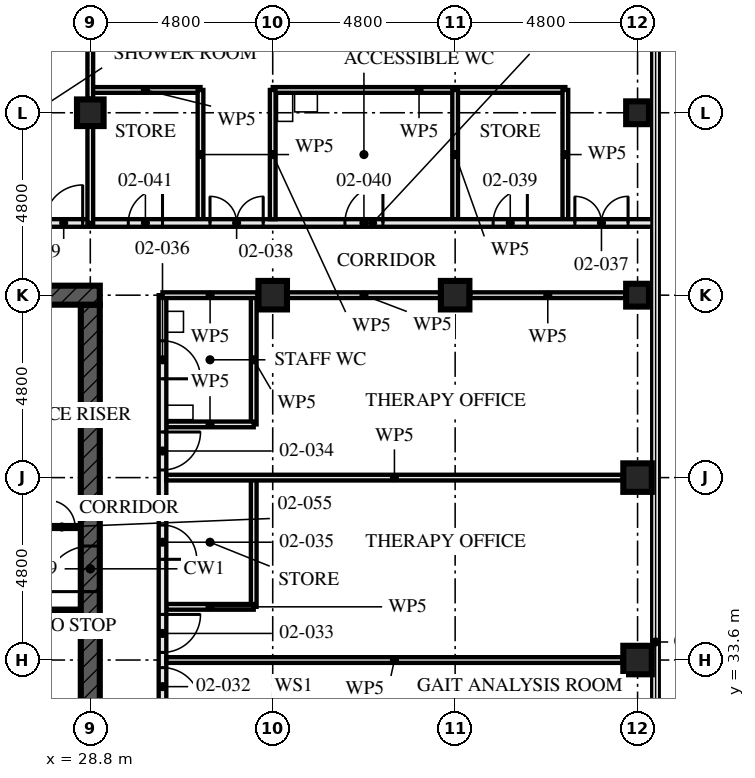
"""IFC4 building model, lengths in metres.
Left out: names, types, materials, properties, quantities, classifications, styles, units other than length and angle.
Written with IfcOpenShell. Run it as: python <this file> out.ifc"""

import sys

from ifc_helpers import new_model, si_unit, direction, frame, frame_2d, origin, origin_2d, place, context, subcontext, project, spatial, rectangle, hollow_rectangle, extrude, element, fill, save


model = new_model("IFC4")
c1 = context("Model", 3, precision=1e-05, world=origin(), true_north=direction((0.0, 1.0)))
c2 = subcontext(c1, "Body", "Model", "MODEL_VIEW")
j1 = project(units=[si_unit("LENGTHUNIT", "METRE"), si_unit("PLANEANGLEUNIT", "RADIAN")], contexts=[c1])
p1 = place(None, origin())
s1 = spatial("IfcSite", under=j1, at=p1, CompositionType="ELEMENT")
p2 = place(p1, origin())
s2 = spatial("IfcBuilding", under=s1, at=p2, CompositionType="ELEMENT")
p3 = place(p2, frame((0.0, 0.0, 9.0)))
s3 = spatial("IfcBuildingStorey", under=s2, at=p3, CompositionType="ELEMENT", Elevation=9.0)
p4 = place(p3, frame((28.8, 48.0, 0.0), z_axis=(0.0, 0.0, 1.0), x_axis=(1.0, 0.0, 0.0)))
e1 = element("IfcColumn", 1, at=p4, inside=s3, PredefinedType="COLUMN", context=c2, shape_type="SweptSolid", body=[
    extrude(hollow_rectangle(XDim=0.7, YDim=0.7, WallThickness=0.06, at=origin_2d()), origin(), (0.0, 0.0, 1.0), 4.5),
])
for number, where, z_axis, x_axis in (
    (2, (33.6, 43.2, 0.0), (0.0, 0.0, 1.0), (0.0, 1.0, 0.0)),
    (3, (38.4, 43.2, 0.0), (0.0, 0.0, 1.0), (0.0, 1.0, 0.0)),
    (4, (43.2, 33.6, 0.0), (0.0, 0.0, 1.0), (1.0, 0.0, 0.0)),
    (5, (43.2, 38.4, 0.0), (0.0, 0.0, 1.0), (1.0, 0.0, 0.0)),
):
    element("IfcColumn", number, at=place(p3, frame(where, z_axis=z_axis, x_axis=x_axis)), inside=s3, PredefinedType="COLUMN", context=c2, shape_type="SweptSolid", body=[
        extrude(hollow_rectangle(XDim=0.75, YDim=0.75, WallThickness=0.08, at=origin_2d()), origin(), (0.0, 0.0, 1.0), 4.5),
    ])
for number, where, z_axis, x_axis in (
    (6, (43.2, 43.2, 0.0), (0.0, 0.0, 1.0), (0.0, 1.0, 0.0)),
    (7, (43.2, 48.0, 0.0), (0.0, 0.0, 1.0), (1.0, 0.0, 0.0)),
):
    element("IfcColumn", number, at=place(p3, frame(where, z_axis=z_axis, x_axis=x_axis)), inside=s3, PredefinedType="COLUMN", context=c2, shape_type="SweptSolid", body=[
        extrude(hollow_rectangle(XDim=0.6, YDim=0.6, WallThickness=0.08, at=origin_2d()), origin(), (0.0, 0.0, 1.0), 4.5),
    ])
p5 = place(p3, frame((29.05, 43.2, -0.17), z_axis=(0.0, 0.0, 1.0), x_axis=(-1.0, 0.0, 0.0)))
e8 = element("IfcWall", 8, at=p5, inside=s3, PredefinedType="SHEAR", context=c2, shape_type="SweptSolid", body=[
    extrude(rectangle(XDim=14.9, YDim=0.5, at=frame_2d((7.45, 0.0))), origin(), (0.0, 0.0, 1.0), 4.5),
])
p6 = place(p5, frame((6.85, 0.0, 0.17)))
e9 = element("IfcOpeningElement", 9, at=p6, cuts=e8, PredefinedType="OPENING", context=c2, shape_type="SweptSolid", body=[
    extrude(rectangle(XDim=1.2, YDim=2.1, at=frame_2d((0.6, 1.05))), frame((0.0, 0.26, 0.0), z_axis=(0.0, -1.0, 0.0), x_axis=(1.0, 0.0, 0.0)), (0.0, 0.0, 1.0), 0.521),
])
p7 = place(p3, frame((28.8, 29.05, -0.17), z_axis=(0.0, 0.0, 1.0), x_axis=(0.0, 1.0, 0.0)))
e10 = element("IfcWall", 10, at=p7, inside=s3, PredefinedType="SHEAR", context=c2, shape_type="SweptSolid", body=[
    extrude(rectangle(XDim=13.9, YDim=0.5, at=frame_2d((6.95, 0.0))), origin(), (0.0, 0.0, 1.0), 4.5),
])
p8 = place(p7, frame((6.35, 0.0, 0.17)))
e11 = element("IfcOpeningElement", 11, at=p8, cuts=e10, PredefinedType="OPENING", context=c2, shape_type="SweptSolid", body=[
    extrude(rectangle(XDim=1.2, YDim=2.1, at=frame_2d((0.6, 1.05))), frame((0.0, 0.26, 0.0), z_axis=(0.0, -1.0, 0.0), x_axis=(1.0, 0.0, 0.0)), (0.0, 0.0, 1.0), 0.521),
])
p9 = place(p3, frame((28.8, 45.1, 0.0), z_axis=(0.0, 0.0, 1.0), x_axis=(-1.0, 0.0, 0.0)))
e12 = element("IfcWall", 12, at=p9, inside=s3, PredefinedType="PARTITIONING", context=c2, shape_type="SweptSolid", body=[
    extrude(rectangle(XDim=14.4, YDim=0.2, at=frame_2d((7.2, 0.0))), origin(), (0.0, 0.0, 1.0), 4.33),
])
p10 = place(p9, frame((0.2, 0.0, 0.0)))
e13 = element("IfcOpeningElement", 13, at=p10, cuts=e12, PredefinedType="OPENING", context=c2, shape_type="SweptSolid", body=[
    extrude(rectangle(XDim=1.0, YDim=2.4, at=frame_2d((0.5, 1.2))), frame((0.0, 0.111, 0.0), z_axis=(0.0, -1.0, 0.0), x_axis=(1.0, 0.0, 0.0)), (0.0, 0.0, 1.0), 0.221),
])
p11 = place(p9, frame((5.0, 0.0, 0.0)))
e14 = element("IfcOpeningElement", 14, at=p11, cuts=e12, PredefinedType="OPENING", context=c2, shape_type="SweptSolid", body=[
    extrude(rectangle(XDim=1.0, YDim=2.4, at=frame_2d((0.5, 1.2))), frame((0.0, 0.111, 0.0), z_axis=(0.0, -1.0, 0.0), x_axis=(1.0, 0.0, 0.0)), (0.0, 0.0, 1.0), 0.221),
])
p12 = place(p9, frame((9.8, 0.0, 0.0)))
e15 = element("IfcOpeningElement", 15, at=p12, cuts=e12, PredefinedType="OPENING", context=c2, shape_type="SweptSolid", body=[
    extrude(rectangle(XDim=1.0, YDim=2.4, at=frame_2d((0.5, 1.2))), frame((0.0, 0.111, 0.0), z_axis=(0.0, -1.0, 0.0), x_axis=(1.0, 0.0, 0.0)), (0.0, 0.0, 1.0), 0.221),
])
p13 = place(p9, frame((2.65, 0.0, 0.0)))
e16 = element("IfcOpeningElement", 16, at=p13, cuts=e12, PredefinedType="OPENING", context=c2, shape_type="SweptSolid", body=[
    extrude(rectangle(XDim=0.9, YDim=2.1, at=frame_2d((0.45, 1.05))), frame((0.0, 0.111, 0.0), z_axis=(0.0, -1.0, 0.0), x_axis=(1.0, 0.0, 0.0)), (0.0, 0.0, 1.0), 0.221),
])
p14 = place(p9, frame((7.45, 0.0, 0.0)))
e17 = element("IfcOpeningElement", 17, at=p14, cuts=e12, PredefinedType="OPENING", context=c2, shape_type="SweptSolid", body=[
    extrude(rectangle(XDim=0.9, YDim=2.1, at=frame_2d((0.45, 1.05))), frame((0.0, 0.111, 0.0), z_axis=(0.0, -1.0, 0.0), x_axis=(1.0, 0.0, 0.0)), (0.0, 0.0, 1.0), 0.221),
])
p15 = place(p9, frame((12.25, 0.0, 0.0)))
e18 = element("IfcOpeningElement", 18, at=p15, cuts=e12, PredefinedType="OPENING", context=c2, shape_type="SweptSolid", body=[
    extrude(rectangle(XDim=0.9, YDim=2.1, at=frame_2d((0.45, 1.05))), frame((0.0, 0.111, 0.0), z_axis=(0.0, -1.0, 0.0), x_axis=(1.0, 0.0, 0.0)), (0.0, 0.0, 1.0), 0.221),
])
p16 = place(p3, frame((33.1, 35.0, 0.0), z_axis=(0.0, 0.0, 1.0), x_axis=(-1.0, 0.0, 0.0)))
e19 = element("IfcWall", 19, at=p16, inside=s3, PredefinedType="PARTITIONING", context=c2, shape_type="SweptSolid", body=[
    extrude(rectangle(XDim=2.3, YDim=0.15, at=frame_2d((1.15, 0.0))), origin(), (0.0, 0.0, 1.0), 4.33),
])
p17 = place(p3, frame((33.1, 35.0, 0.0), z_axis=(0.0, 0.0, 1.0), x_axis=(0.0, 1.0, 0.0)))
e20 = element("IfcWall", 20, at=p17, inside=s3, PredefinedType="PARTITIONING", context=c2, shape_type="SweptSolid", body=[
    extrude(rectangle(XDim=3.4, YDim=0.15, at=frame_2d((1.7, 0.0))), origin(), (0.0, 0.0, 1.0), 4.33),
])
p18 = place(p3, frame((33.1, 39.8, 0.0), z_axis=(0.0, 0.0, 1.0), x_axis=(-1.0, 0.0, 0.0)))
e21 = element("IfcWall", 21, at=p18, inside=s3, PredefinedType="PARTITIONING", context=c2, shape_type="SweptSolid", body=[
    extrude(rectangle(XDim=2.3, YDim=0.15, at=frame_2d((1.15, 0.0))), origin(), (0.0, 0.0, 1.0), 4.33),
])
p19 = place(p3, frame((33.1, 39.8, 0.0), z_axis=(0.0, 0.0, 1.0), x_axis=(0.0, 1.0, 0.0)))
e22 = element("IfcWall", 22, at=p19, inside=s3, PredefinedType="PARTITIONING", context=c2, shape_type="SweptSolid", body=[
    extrude(rectangle(XDim=3.4, YDim=0.15, at=frame_2d((1.7, 0.0))), origin(), (0.0, 0.0, 1.0), 4.33),
])
for number, where, z_axis, x_axis in (
    (23, (42.805, 33.6, 0.0), (0.0, 0.0, 1.0), (-1.0, 0.0, 0.0)),
    (24, (42.805, 38.4, 0.0), (0.0, 0.0, 1.0), (-1.0, 0.0, 0.0)),
):
    element("IfcWall", number, at=place(p3, frame(where, z_axis=z_axis, x_axis=x_axis)), inside=s3, PredefinedType="PARTITIONING", context=c2, shape_type="SweptSolid", body=[
        extrude(rectangle(XDim=12.005, YDim=0.15, at=frame_2d((6.002, 0.0))), origin(), (0.0, 0.0, 1.0), 3.55),
    ])
p20 = place(p3, frame((30.7, 28.8, 0.0), z_axis=(0.0, 0.0, 1.0), x_axis=(0.0, 1.0, 0.0)))
e25 = element("IfcWall", 25, at=p20, inside=s3, PredefinedType="PARTITIONING", context=c2, shape_type="SweptSolid", body=[
    extrude(rectangle(XDim=14.4, YDim=0.2, at=frame_2d((7.2, 0.0))), origin(), (0.0, 0.0, 1.0), 3.55),
])
p21 = place(p20, frame((1.4, 0.0, 0.0)))
e26 = element("IfcOpeningElement", 26, at=p21, cuts=e25, PredefinedType="OPENING", context=c2, shape_type="SweptSolid", body=[
    extrude(rectangle(XDim=1.0, YDim=2.1, at=frame_2d((0.5, 1.05))), frame((0.0, 0.111, 0.0), z_axis=(0.0, -1.0, 0.0), x_axis=(1.0, 0.0, 0.0)), (0.0, 0.0, 1.0), 0.221),
])
p22 = place(p20, frame((3.6, 0.0, 0.0)))
e27 = element("IfcOpeningElement", 27, at=p22, cuts=e25, PredefinedType="OPENING", context=c2, shape_type="SweptSolid", body=[
    extrude(rectangle(XDim=1.0, YDim=2.4, at=frame_2d((0.5, 1.2))), frame((0.0, 0.111, 0.0), z_axis=(0.0, -1.0, 0.0), x_axis=(1.0, 0.0, 0.0)), (0.0, 0.0, 1.0), 0.221),
])
p23 = place(p20, frame((5.0, 0.0, 0.0)))
e28 = element("IfcOpeningElement", 28, at=p23, cuts=e25, PredefinedType="OPENING", context=c2, shape_type="SweptSolid", body=[
    extrude(rectangle(XDim=1.0, YDim=2.4, at=frame_2d((0.5, 1.2))), frame((0.0, 0.111, 0.0), z_axis=(0.0, -1.0, 0.0), x_axis=(1.0, 0.0, 0.0)), (0.0, 0.0, 1.0), 0.221),
])
p24 = place(p20, frame((9.8, 0.0, 0.0)))
e29 = element("IfcOpeningElement", 29, at=p24, cuts=e25, PredefinedType="OPENING", context=c2, shape_type="SweptSolid", body=[
    extrude(rectangle(XDim=1.0, YDim=2.4, at=frame_2d((0.5, 1.2))), frame((0.0, 0.111, 0.0), z_axis=(0.0, -1.0, 0.0), x_axis=(1.0, 0.0, 0.0)), (0.0, 0.0, 1.0), 0.221),
])
p25 = place(p20, frame((7.45, 0.0, 0.0)))
e30 = element("IfcOpeningElement", 30, at=p25, cuts=e25, PredefinedType="OPENING", context=c2, shape_type="SweptSolid", body=[
    extrude(rectangle(XDim=0.9, YDim=2.1, at=frame_2d((0.45, 1.05))), frame((0.0, 0.111, 0.0), z_axis=(0.0, -1.0, 0.0), x_axis=(1.0, 0.0, 0.0)), (0.0, 0.0, 1.0), 0.221),
])
p26 = place(p20, frame((12.2, 0.0, 0.0)))
e31 = element("IfcOpeningElement", 31, at=p26, cuts=e25, PredefinedType="OPENING", context=c2, shape_type="SweptSolid", body=[
    extrude(rectangle(XDim=1.0, YDim=2.1, at=frame_2d((0.5, 1.05))), frame((0.0, 0.111, 0.0), z_axis=(0.0, -1.0, 0.0), x_axis=(1.0, 0.0, 0.0)), (0.0, 0.0, 1.0), 0.221),
])
for number, where, z_axis, x_axis in (
    (32, (33.6, 48.6, 0.0), (0.0, 0.0, 1.0), (0.0, -1.0, 0.0)),
    (33, (41.3, 48.6, 0.0), (0.0, 0.0, 1.0), (0.0, -1.0, 0.0)),
):
    element("IfcWall", number, at=place(p3, frame(where, z_axis=z_axis, x_axis=x_axis)), inside=s3, PredefinedType="PARTITIONING", context=c2, shape_type="SweptSolid", body=[
        extrude(rectangle(XDim=3.4, YDim=0.15, at=frame_2d((1.7, 0.0))), origin(), (0.0, 0.0, 1.0), 3.55),
    ])
p27 = place(p3, frame((41.3, 48.6, 0.0), z_axis=(0.0, 0.0, 1.0), x_axis=(-1.0, 0.0, 0.0)))
e34 = element("IfcWall", 34, at=p27, inside=s3, PredefinedType="PARTITIONING", context=c2, shape_type="SweptSolid", body=[
    extrude(rectangle(XDim=7.7, YDim=0.15, at=frame_2d((3.85, 0.0))), origin(), (0.0, 0.0, 1.0), 4.33),
])
for number, where, z_axis, x_axis in (
    (35, (38.4, 48.6, 0.0), (0.0, 0.0, 1.0), (0.0, -1.0, 0.0)),
    (36, (31.7, 48.6, 0.0), (0.0, 0.0, 1.0), (0.0, -1.0, 0.0)),
):
    element("IfcWall", number, at=place(p3, frame(where, z_axis=z_axis, x_axis=x_axis)), inside=s3, PredefinedType="PARTITIONING", context=c2, shape_type="SweptSolid", body=[
        extrude(rectangle(XDim=3.4, YDim=0.15, at=frame_2d((1.7, 0.0))), origin(), (0.0, 0.0, 1.0), 3.55),
    ])
p28 = place(p3, frame((31.7, 48.6, 0.0), z_axis=(0.0, 0.0, 1.0), x_axis=(-1.0, 0.0, 0.0)))
e37 = element("IfcWall", 37, at=p28, inside=s3, PredefinedType="PARTITIONING", context=c2, shape_type="SweptSolid", body=[
    extrude(rectangle(XDim=2.9, YDim=0.15, at=frame_2d((1.45, 0.0))), origin(), (0.0, 0.0, 1.0), 4.33),
])
p29 = place(p3, frame((43.655, 45.1, 0.0), z_axis=(0.0, 0.0, 1.0), x_axis=(-1.0, 0.0, 0.0)))
e38 = element("IfcWall", 38, at=p29, inside=s3, PredefinedType="PARTITIONING", context=c2, shape_type="SweptSolid", body=[
    extrude(rectangle(XDim=14.855, YDim=0.2, at=frame_2d((7.427, 0.0))), origin(), (0.0, 0.0, 1.0), 3.32),
])
p30 = place(p29, frame((0.705, 0.0, 0.0)))
e39 = element("IfcOpeningElement", 39, at=p30, cuts=e38, PredefinedType="OPENING", context=c2, shape_type="SweptSolid", body=[
    extrude(rectangle(XDim=1.4, YDim=2.4, at=frame_2d((0.7, 1.2))), frame((0.0, 0.111, 0.0), z_axis=(0.0, -1.0, 0.0), x_axis=(1.0, 0.0, 0.0)), (0.0, 0.0, 1.0), 0.221),
])
p31 = place(p29, frame((10.305, 0.0, 0.0)))
e40 = element("IfcOpeningElement", 40, at=p31, cuts=e38, PredefinedType="OPENING", context=c2, shape_type="SweptSolid", body=[
    extrude(rectangle(XDim=1.4, YDim=2.4, at=frame_2d((0.7, 1.2))), frame((0.0, 0.111, 0.0), z_axis=(0.0, -1.0, 0.0), x_axis=(1.0, 0.0, 0.0)), (0.0, 0.0, 1.0), 0.221),
])
p32 = place(p29, frame((3.355, 0.0, 0.0)))
e41 = element("IfcOpeningElement", 41, at=p32, cuts=e38, PredefinedType="OPENING", context=c2, shape_type="SweptSolid", body=[
    extrude(rectangle(XDim=0.9, YDim=2.1, at=frame_2d((0.45, 1.05))), frame((0.0, 0.111, 0.0), z_axis=(0.0, -1.0, 0.0), x_axis=(1.0, 0.0, 0.0)), (0.0, 0.0, 1.0), 0.221),
])
p33 = place(p29, frame((7.155, 0.0, 0.0)))
e42 = element("IfcOpeningElement", 42, at=p33, cuts=e38, PredefinedType="OPENING", context=c2, shape_type="SweptSolid", body=[
    extrude(rectangle(XDim=1.0, YDim=2.1, at=frame_2d((0.5, 1.05))), frame((0.0, 0.111, 0.0), z_axis=(0.0, -1.0, 0.0), x_axis=(1.0, 0.0, 0.0)), (0.0, 0.0, 1.0), 0.221),
])
p34 = place(p29, frame((12.955, 0.0, 0.0)))
e43 = element("IfcOpeningElement", 43, at=p34, cuts=e38, PredefinedType="OPENING", context=c2, shape_type="SweptSolid", body=[
    extrude(rectangle(XDim=0.9, YDim=2.1, at=frame_2d((0.45, 1.05))), frame((0.0, 0.111, 0.0), z_axis=(0.0, -1.0, 0.0), x_axis=(1.0, 0.0, 0.0)), (0.0, 0.0, 1.0), 0.221),
])
p35 = place(p3, frame((23.05, 34.9, 0.0), z_axis=(0.0, 0.0, 1.0), x_axis=(1.0, 0.0, 0.0)))
e44 = element("IfcWall", 44, at=p35, inside=s3, PredefinedType="SOLIDWALL", context=c2, shape_type="SweptSolid", body=[
    extrude(rectangle(XDim=5.5, YDim=0.1, at=frame_2d((2.75, 0.0))), origin(), (0.0, 0.0, 1.0), 4.33),
])
p36 = place(p3, frame((22.65, 37.1, 0.0), z_axis=(0.0, 0.0, 1.0), x_axis=(1.0, 0.0, 0.0)))
e45 = element("IfcWall", 45, at=p36, inside=s3, PredefinedType="SOLIDWALL", context=c2, shape_type="SweptSolid", body=[
    extrude(rectangle(XDim=5.9, YDim=0.1, at=frame_2d((2.95, 0.0))), origin(), (0.0, 0.0, 1.0), 4.33),
])
p37 = place(p36, frame((3.45, 0.0, 0.0)))
e46 = element("IfcOpeningElement", 46, at=p37, cuts=e45, PredefinedType="OPENING", context=c2, shape_type="SweptSolid", body=[
    extrude(rectangle(XDim=1.0, YDim=2.1, at=frame_2d((0.5, 1.05))), frame((0.0, 0.061, 0.0), z_axis=(0.0, -1.0, 0.0), x_axis=(1.0, 0.0, 0.0)), (0.0, 0.0, 1.0), 0.121),
])
p38 = place(p36, frame((5.05, 0.0, 0.0)))
e47 = element("IfcOpeningElement", 47, at=p38, cuts=e45, PredefinedType="OPENING", context=c2, shape_type="SweptSolid", body=[
    extrude(rectangle(XDim=0.7, YDim=2.1, at=frame_2d((0.35, 1.05))), frame((0.0, 0.061, 0.0), z_axis=(0.0, -1.0, 0.0), x_axis=(1.0, 0.0, 0.0)), (0.0, 0.0, 1.0), 0.121),
])
p39 = place(p3, frame((28.8, 45.1, 0.0), z_axis=(0.0, 0.0, 1.0), x_axis=(0.0, 1.0, 0.0)))
e48 = element("IfcWall", 48, at=p39, inside=s3, PredefinedType="PARTITIONING", context=c2, shape_type="SweptSolid", body=[
    extrude(rectangle(XDim=2.53, YDim=0.15, at=frame_2d((1.265, 0.0))), origin(), (0.0, 0.0, 1.0), 3.32),
])
p40 = place(p3, frame((28.8, 48.37, 0.0), z_axis=(0.0, 0.0, 1.0), x_axis=(0.0, 1.0, 0.0)))
e49 = element("IfcWall", 49, at=p40, inside=s3, PredefinedType="PARTITIONING", context=c2, shape_type="SweptSolid", body=[
    extrude(rectangle(XDim=4.06, YDim=0.15, at=frame_2d((2.03, 0.0))), origin(), (0.0, 0.0, 1.0), 3.32),
])
p41 = place(p3, frame((42.88, 43.2, 0.0), z_axis=(0.0, 0.0, 1.0), x_axis=(-1.0, 0.0, 0.0)))
e50 = element("IfcWall", 50, at=p41, inside=s3, PredefinedType="PARTITIONING", context=c2, shape_type="SweptSolid", body=[
    extrude(rectangle(XDim=4.085, YDim=0.15, at=frame_2d((2.042, 0.0))), origin(), (0.0, 0.0, 1.0), 3.32),
])
p42 = place(p3, frame((38.005, 43.2, 0.0), z_axis=(0.0, 0.0, 1.0), x_axis=(-1.0, 0.0, 0.0)))
e51 = element("IfcWall", 51, at=p42, inside=s3, PredefinedType="PARTITIONING", context=c2, shape_type="SweptSolid", body=[
    extrude(rectangle(XDim=4.01, YDim=0.15, at=frame_2d((2.005, 0.0))), origin(), (0.0, 0.0, 1.0), 3.32),
])
p43 = place(p3, frame((33.205, 43.2, 0.0), z_axis=(0.0, 0.0, 1.0), x_axis=(-1.0, 0.0, 0.0)))
e52 = element("IfcWall", 52, at=p43, inside=s3, PredefinedType="PARTITIONING", context=c2, shape_type="SweptSolid", body=[
    extrude(rectangle(XDim=2.505, YDim=0.15, at=frame_2d((1.252, 0.0))), origin(), (0.0, 0.0, 1.0), 3.32),
])
p44 = place(p10, frame((1.0, 0.0, 0.0), z_axis=(0.0, 0.0, 1.0), x_axis=(-1.0, 0.0, 0.0)))
e53 = element("IfcDoor", 53, at=p44, inside=s3, OperationType="SINGLE_SWING_LEFT", PredefinedType="DOOR", context=c2, shape_type="SweptSolid", body=[
    extrude(rectangle(XDim=1.0, YDim=2.4, at=frame_2d((0.5, 1.2))), frame((0.0, 0.027, 0.0), z_axis=(0.0, -1.0, 0.0), x_axis=(1.0, 0.0, 0.0)), (0.0, 0.0, 1.0), 0.054),
])
fill(e13, e53)
p45 = place(p22, frame((1.0, 0.0, 0.0), z_axis=(0.0, 0.0, 1.0), x_axis=(-1.0, 0.0, 0.0)))
e54 = element("IfcDoor", 54, at=p45, inside=s3, OperationType="SINGLE_SWING_LEFT", PredefinedType="DOOR", context=c2, shape_type="SweptSolid", body=[
    extrude(rectangle(XDim=1.0, YDim=2.4, at=frame_2d((0.5, 1.2))), frame((0.0, 0.027, 0.0), z_axis=(0.0, -1.0, 0.0), x_axis=(1.0, 0.0, 0.0)), (0.0, 0.0, 1.0), 0.054),
])
fill(e27, e54)
p46 = place(p23, frame((1.0, 0.0, 0.0), z_axis=(0.0, 0.0, 1.0), x_axis=(-1.0, 0.0, 0.0)))
e55 = element("IfcDoor", 55, at=p46, inside=s3, OperationType="SINGLE_SWING_RIGHT", PredefinedType="DOOR", context=c2, shape_type="SweptSolid", body=[
    extrude(rectangle(XDim=1.0, YDim=2.4, at=frame_2d((0.5, 1.2))), frame((0.0, 0.027, 0.0), z_axis=(0.0, -1.0, 0.0), x_axis=(1.0, 0.0, 0.0)), (0.0, 0.0, 1.0), 0.054),
])
fill(e28, e55)
p47 = place(p24, frame((1.0, 0.0, 0.0), z_axis=(0.0, 0.0, 1.0), x_axis=(-1.0, 0.0, 0.0)))
e56 = element("IfcDoor", 56, at=p47, inside=s3, OperationType="SINGLE_SWING_RIGHT", PredefinedType="DOOR", context=c2, shape_type="SweptSolid", body=[
    extrude(rectangle(XDim=1.0, YDim=2.4, at=frame_2d((0.5, 1.2))), frame((0.0, 0.027, 0.0), z_axis=(0.0, -1.0, 0.0), x_axis=(1.0, 0.0, 0.0)), (0.0, 0.0, 1.0), 0.054),
])
fill(e29, e56)
p48 = place(p25, frame((0.9, 0.0, 0.0), z_axis=(0.0, 0.0, 1.0), x_axis=(-1.0, 0.0, 0.0)))
e57 = element("IfcDoor", 57, at=p48, inside=s3, OperationType="SINGLE_SWING_LEFT", PredefinedType="DOOR", context=c2, shape_type="SweptSolid", body=[
    extrude(rectangle(XDim=0.9, YDim=2.1, at=frame_2d((0.45, 1.05))), frame((0.0, 0.027, 0.0), z_axis=(0.0, -1.0, 0.0), x_axis=(1.0, 0.0, 0.0)), (0.0, 0.0, 1.0), 0.054),
])
fill(e30, e57)
p49 = place(p26, frame((1.0, 0.0, 0.0), z_axis=(0.0, 0.0, 1.0), x_axis=(-1.0, 0.0, 0.0)))
e58 = element("IfcDoor", 58, at=p49, inside=s3, OperationType="SINGLE_SWING_LEFT", PredefinedType="DOOR", context=c2, shape_type="SweptSolid", body=[
    extrude(rectangle(XDim=1.0, YDim=2.1, at=frame_2d((0.5, 1.05))), frame((0.0, 0.027, 0.0), z_axis=(0.0, -1.0, 0.0), x_axis=(1.0, 0.0, 0.0)), (0.0, 0.0, 1.0), 0.054),
])
fill(e31, e58)
p50 = place(p30, frame((1.4, 0.0, 0.0), z_axis=(0.0, 0.0, 1.0), x_axis=(-1.0, 0.0, 0.0)))
e59 = element("IfcDoor", 59, at=p50, inside=s3, OperationType="DOUBLE_DOOR_SINGLE_SWING", PredefinedType="DOOR", context=c2, shape_type="SweptSolid", body=[
    extrude(rectangle(XDim=1.4, YDim=2.4, at=frame_2d((0.7, 1.2))), frame((0.0, 0.027, 0.0), z_axis=(0.0, -1.0, 0.0), x_axis=(1.0, 0.0, 0.0)), (0.0, 0.0, 1.0), 0.054),
])
fill(e39, e59)
p51 = place(p31, frame((1.4, 0.0, 0.0), z_axis=(0.0, 0.0, 1.0), x_axis=(-1.0, 0.0, 0.0)))
e60 = element("IfcDoor", 60, at=p51, inside=s3, OperationType="DOUBLE_DOOR_SINGLE_SWING", PredefinedType="DOOR", context=c2, shape_type="SweptSolid", body=[
    extrude(rectangle(XDim=1.4, YDim=2.4, at=frame_2d((0.7, 1.2))), frame((0.0, 0.027, 0.0), z_axis=(0.0, -1.0, 0.0), x_axis=(1.0, 0.0, 0.0)), (0.0, 0.0, 1.0), 0.054),
])
fill(e40, e60)
p52 = place(p32, frame((0.9, 0.0, 0.0), z_axis=(0.0, 0.0, 1.0), x_axis=(-1.0, 0.0, 0.0)))
e61 = element("IfcDoor", 61, at=p52, inside=s3, OperationType="SINGLE_SWING_LEFT", PredefinedType="DOOR", context=c2, shape_type="SweptSolid", body=[
    extrude(rectangle(XDim=0.9, YDim=2.1, at=frame_2d((0.45, 1.05))), frame((0.0, 0.027, 0.0), z_axis=(0.0, -1.0, 0.0), x_axis=(1.0, 0.0, 0.0)), (0.0, 0.0, 1.0), 0.054),
])
fill(e41, e61)
p53 = place(p33, frame((1.0, 0.0, 0.0), z_axis=(0.0, 0.0, 1.0), x_axis=(-1.0, 0.0, 0.0)))
e62 = element("IfcDoor", 62, at=p53, inside=s3, OperationType="SINGLE_SWING_LEFT", PredefinedType="DOOR", context=c2, shape_type="SweptSolid", body=[
    extrude(rectangle(XDim=1.0, YDim=2.1, at=frame_2d((0.5, 1.05))), frame((0.0, 0.027, 0.0), z_axis=(0.0, -1.0, 0.0), x_axis=(1.0, 0.0, 0.0)), (0.0, 0.0, 1.0), 0.054),
])
fill(e42, e62)
p54 = place(p34, frame((0.9, 0.0, 0.0), z_axis=(0.0, 0.0, 1.0), x_axis=(-1.0, 0.0, 0.0)))
e63 = element("IfcDoor", 63, at=p54, inside=s3, OperationType="SINGLE_SWING_LEFT", PredefinedType="DOOR", context=c2, shape_type="SweptSolid", body=[
    extrude(rectangle(XDim=0.9, YDim=2.1, at=frame_2d((0.45, 1.05))), frame((0.0, 0.027, 0.0), z_axis=(0.0, -1.0, 0.0), x_axis=(1.0, 0.0, 0.0)), (0.0, 0.0, 1.0), 0.054),
])
fill(e43, e63)
p55 = place(p38, origin())
e64 = element("IfcDoor", 64, at=p55, inside=s3, OperationType="SINGLE_SWING_RIGHT", PredefinedType="DOOR", context=c2, shape_type="SweptSolid", body=[
    extrude(rectangle(XDim=0.7, YDim=2.1, at=frame_2d((0.35, 1.05))), frame((0.0, 0.027, 0.0), z_axis=(0.0, -1.0, 0.0), x_axis=(1.0, 0.0, 0.0)), (0.0, 0.0, 1.0), 0.054),
])
fill(e47, e64)
p56 = place(p8, origin())
e65 = element("IfcDoor", 65, at=p56, inside=s3, OperationType="SINGLE_SWING_LEFT", PredefinedType="DOOR", context=c2, shape_type="SweptSolid", body=[
    extrude(rectangle(XDim=1.2, YDim=2.1, at=frame_2d((0.6, 1.05))), frame((0.0, 0.027, 0.0), z_axis=(0.0, -1.0, 0.0), x_axis=(1.0, 0.0, 0.0)), (0.0, 0.0, 1.0), 0.054),
])
fill(e11, e65)
save(model, sys.argv[1])
